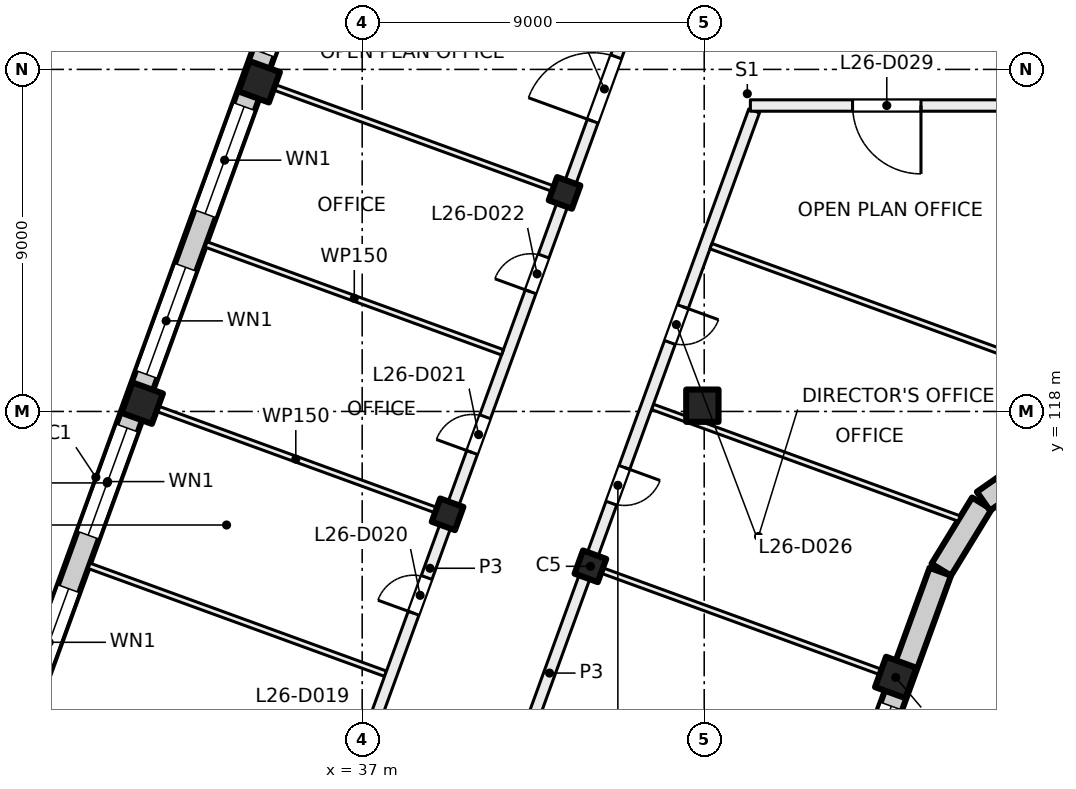
"""IFC4 building model, lengths in metres.
Left out: names, types, materials, properties, quantities, classifications, styles, units other than length and angle.
Written with IfcOpenShell. Run it as: python <this file> out.ifc"""

import sys

from ifc_helpers import new_model, si_unit, direction, frame, frame_2d, origin, origin_2d, place, context, subcontext, project, spatial, rectangle, extrude, element, fill, save


model = new_model("IFC4")
c1 = context("Model", 3, precision=1e-05, world=origin(), true_north=direction((0.0, 1.0)))
c2 = subcontext(c1, "Body", "Model", "MODEL_VIEW")
j1 = project(units=[si_unit("LENGTHUNIT", "METRE"), si_unit("PLANEANGLEUNIT", "RADIAN")], contexts=[c1])
p1 = place(None, origin())
s1 = spatial("IfcSite", under=j1, at=p1, CompositionType="ELEMENT")
p2 = place(p1, origin())
s2 = spatial("IfcBuilding", under=s1, at=p2, CompositionType="ELEMENT")
p3 = place(p2, frame((0.0, 0.0, 113.0)))
s3 = spatial("IfcBuildingStorey", under=s2, at=p3, CompositionType="ELEMENT", Elevation=113.0)
p4 = place(p3, frame((45.952, 118.152, 0.0), z_axis=(0.0, 0.0, 1.0), x_axis=(1.0, 0.0, 0.0)))
e1 = element("IfcColumn", 1, at=p4, inside=s3, PredefinedType="COLUMN", context=c2, shape_type="SweptSolid", body=[
    extrude(rectangle(XDim=0.85, YDim=0.85, at=origin_2d()), origin(), (0.0, 0.0, 1.0), 4.0),
])
for number, where, z_axis, x_axis in (
    (2, (43.006, 113.925, 0.0), (0.0, 0.0, 1.0), (-0.342, -0.94, 0.0)),
    (3, (42.325, 123.751, 0.0), (0.0, 0.0, 1.0), (-0.342, -0.94, 0.0)),
    (4, (39.247, 115.293, 0.0), (0.0, 0.0, 1.0), (-0.342, -0.94, 0.0)),
):
    element("IfcColumn", number, at=place(p3, frame(where, z_axis=z_axis, x_axis=x_axis)), inside=s3, PredefinedType="COLUMN", context=c2, shape_type="SweptSolid", body=[
        extrude(rectangle(XDim=0.65, YDim=0.65, at=origin_2d()), origin(), (0.0, 0.0, 1.0), 4.0),
    ])
for number, where, z_axis, x_axis in (
    (5, (51.04, 111.001, 0.0), (0.0, 0.0, 1.0), (-0.342, -0.94, 0.0)),
    (6, (34.291, 126.675, 0.0), (0.0, 0.0, 1.0), (-0.342, -0.94, 0.0)),
    (7, (31.212, 118.218, 0.0), (0.0, 0.0, 1.0), (-0.342, -0.94, 0.0)),
):
    element("IfcColumn", number, at=place(p3, frame(where, z_axis=z_axis, x_axis=x_axis)), inside=s3, PredefinedType="COLUMN", context=c2, shape_type="SweptSolid", body=[
        extrude(rectangle(XDim=0.85, YDim=0.85, at=origin_2d()), origin(), (0.0, 0.0, 1.0), 4.0),
    ])
p5 = place(p3, frame((52.212, 113.783, 0.0), z_axis=(0.0, 0.0, 1.0), x_axis=(-0.34202521188, -0.939690775968, 0.0)))
e8 = element("IfcWall", 8, at=p5, inside=s3, PredefinedType="SOLIDWALL", context=c2, shape_type="SweptSolid", body=[
    extrude(rectangle(XDim=21.745, YDim=0.6, at=frame_2d((10.873, 0.0))), origin(), (0.0, 0.0, 1.0), 3.625),
])
p6 = place(p5, frame((3.765, 0.0, 0.9)))
e9 = element("IfcOpeningElement", 9, at=p6, cuts=e8, PredefinedType="OPENING", context=c2, shape_type="SweptSolid", body=[
    extrude(rectangle(XDim=3.0, YDim=2.4, at=frame_2d((1.5, 1.2))), frame((0.0, 0.31, 0.0), z_axis=(0.0, -1.0, 0.0), x_axis=(1.0, 0.0, 0.0)), (0.0, 0.0, 1.0), 0.62),
])
p7 = place(p5, frame((8.265, 0.0, 0.9)))
e10 = element("IfcOpeningElement", 10, at=p7, cuts=e8, PredefinedType="OPENING", context=c2, shape_type="SweptSolid", body=[
    extrude(rectangle(XDim=3.0, YDim=2.4, at=frame_2d((1.5, 1.2))), frame((0.0, 0.31, 0.0), z_axis=(0.0, -1.0, 0.0), x_axis=(1.0, 0.0, 0.0)), (0.0, 0.0, 1.0), 0.62),
])
p8 = place(p5, frame((12.765, 0.0, 0.9)))
e11 = element("IfcOpeningElement", 11, at=p8, cuts=e8, PredefinedType="OPENING", context=c2, shape_type="SweptSolid", body=[
    extrude(rectangle(XDim=3.0, YDim=2.4, at=frame_2d((1.5, 1.2))), frame((0.0, 0.31, 0.0), z_axis=(0.0, -1.0, 0.0), x_axis=(1.0, 0.0, 0.0)), (0.0, 0.0, 1.0), 0.62),
])
p9 = place(p5, frame((17.265, 0.0, 0.9)))
e12 = element("IfcOpeningElement", 12, at=p9, cuts=e8, PredefinedType="OPENING", context=c2, shape_type="SweptSolid", body=[
    extrude(rectangle(XDim=3.0, YDim=2.4, at=frame_2d((1.5, 1.2))), frame((0.0, 0.31, 0.0), z_axis=(0.0, -1.0, 0.0), x_axis=(1.0, 0.0, 0.0)), (0.0, 0.0, 1.0), 0.62),
])
p10 = place(p3, frame((53.305, 115.578, 0.0), z_axis=(0.0, 0.0, 1.0), x_axis=(-0.522402266438, -0.852699168535, 0.0)))
e13 = element("IfcWall", 13, at=p10, inside=s3, PredefinedType="SOLIDWALL", context=c2, shape_type="SweptSolid", body=[
    extrude(rectangle(XDim=2.042, YDim=0.6, at=frame_2d((1.021, 0.0))), origin(), (0.0, 0.0, 1.0), 3.625),
])
p11 = place(p3, frame((55.062, 116.839, 0.0), z_axis=(0.0, 0.0, 1.0), x_axis=(-0.819122269495, -0.573618956815, 0.0)))
e14 = element("IfcWall", 14, at=p11, inside=s3, PredefinedType="SOLIDWALL", context=c2, shape_type="SweptSolid", body=[
    extrude(rectangle(XDim=2.092, YDim=0.6, at=frame_2d((1.046, 0.0))), origin(), (0.0, 0.0, 1.0), 3.625),
])
p12 = place(p3, frame((24.666, 100.669, 0.0), z_axis=(0.0, 0.0, 1.0), x_axis=(0.34201964167, 0.939692803373, 0.0)))
e15 = element("IfcWall", 15, at=p12, inside=s3, PredefinedType="SOLIDWALL", context=c2, shape_type="SweptSolid", body=[
    extrude(rectangle(XDim=32.884, YDim=0.6, at=frame_2d((16.442, 0.0))), origin(), (0.0, 0.0, 1.0), 3.625),
])
p13 = place(p12, frame((1.48, 0.0, 0.9)))
e16 = element("IfcOpeningElement", 16, at=p13, cuts=e15, PredefinedType="OPENING", context=c2, shape_type="SweptSolid", body=[
    extrude(rectangle(XDim=3.0, YDim=2.4, at=frame_2d((1.5, 1.2))), frame((0.0, 0.31, 0.0), z_axis=(0.0, -1.0, 0.0), x_axis=(1.0, 0.0, 0.0)), (0.0, 0.0, 1.0), 0.62),
])
p14 = place(p12, frame((5.98, 0.0, 0.9)))
e17 = element("IfcOpeningElement", 17, at=p14, cuts=e15, PredefinedType="OPENING", context=c2, shape_type="SweptSolid", body=[
    extrude(rectangle(XDim=3.0, YDim=2.4, at=frame_2d((1.5, 1.2))), frame((0.0, 0.31, 0.0), z_axis=(0.0, -1.0, 0.0), x_axis=(1.0, 0.0, 0.0)), (0.0, 0.0, 1.0), 0.62),
])
p15 = place(p12, frame((10.48, 0.0, 0.9)))
e18 = element("IfcOpeningElement", 18, at=p15, cuts=e15, PredefinedType="OPENING", context=c2, shape_type="SweptSolid", body=[
    extrude(rectangle(XDim=3.0, YDim=2.4, at=frame_2d((1.5, 1.2))), frame((0.0, 0.31, 0.0), z_axis=(0.0, -1.0, 0.0), x_axis=(1.0, 0.0, 0.0)), (0.0, 0.0, 1.0), 0.62),
])
p16 = place(p12, frame((14.98, 0.0, 0.9)))
e19 = element("IfcOpeningElement", 19, at=p16, cuts=e15, PredefinedType="OPENING", context=c2, shape_type="SweptSolid", body=[
    extrude(rectangle(XDim=3.0, YDim=2.4, at=frame_2d((1.5, 1.2))), frame((0.0, 0.31, 0.0), z_axis=(0.0, -1.0, 0.0), x_axis=(1.0, 0.0, 0.0)), (0.0, 0.0, 1.0), 0.62),
])
p17 = place(p12, frame((19.48, 0.0, 0.9)))
e20 = element("IfcOpeningElement", 20, at=p17, cuts=e15, PredefinedType="OPENING", context=c2, shape_type="SweptSolid", body=[
    extrude(rectangle(XDim=3.0, YDim=2.4, at=frame_2d((1.5, 1.2))), frame((0.0, 0.31, 0.0), z_axis=(0.0, -1.0, 0.0), x_axis=(1.0, 0.0, 0.0)), (0.0, 0.0, 1.0), 0.62),
])
p18 = place(p12, frame((23.98, 0.0, 0.9)))
e21 = element("IfcOpeningElement", 21, at=p18, cuts=e15, PredefinedType="OPENING", context=c2, shape_type="SweptSolid", body=[
    extrude(rectangle(XDim=3.0, YDim=2.4, at=frame_2d((1.5, 1.2))), frame((0.0, 0.31, 0.0), z_axis=(0.0, -1.0, 0.0), x_axis=(1.0, 0.0, 0.0)), (0.0, 0.0, 1.0), 0.62),
])
p19 = place(p12, frame((28.48, 0.0, 0.9)))
e22 = element("IfcOpeningElement", 22, at=p19, cuts=e15, PredefinedType="OPENING", context=c2, shape_type="SweptSolid", body=[
    extrude(rectangle(XDim=3.0, YDim=2.4, at=frame_2d((1.5, 1.2))), frame((0.0, 0.31, 0.0), z_axis=(0.0, -1.0, 0.0), x_axis=(1.0, 0.0, 0.0)), (0.0, 0.0, 1.0), 0.62),
])
p20 = place(p3, frame((29.814, 113.938, 0.0), z_axis=(0.0, 0.0, 1.0), x_axis=(0.939697205528, -0.342007546586, 0.0)))
e23 = element("IfcWall", 23, at=p20, inside=s3, PredefinedType="PARTITIONING", context=c2, shape_type="SweptSolid", body=[
    extrude(rectangle(XDim=8.301, YDim=0.15, at=frame_2d((4.15, 0.0))), origin(), (0.0, 0.0, 1.0), 3.625),
])
p21 = place(p3, frame((31.353, 118.166, 0.0), z_axis=(0.0, 0.0, 1.0), x_axis=(0.939687752599, -0.342033518263, 0.0)))
e24 = element("IfcWall", 24, at=p21, inside=s3, PredefinedType="PARTITIONING", context=c2, shape_type="SweptSolid", body=[
    extrude(rectangle(XDim=8.301, YDim=0.15, at=frame_2d((4.15, 0.0))), origin(), (0.0, 0.0, 1.0), 3.625),
])
p22 = place(p3, frame((32.881, 97.657, 0.0), z_axis=(0.0, 0.0, 1.0), x_axis=(0.342017360004, 0.939693633828, 0.0)))
e25 = element("IfcWall", 25, at=p22, inside=s3, PredefinedType="PARTITIONING", context=c2, shape_type="SweptSolid", body=[
    extrude(rectangle(XDim=34.516, YDim=0.3, at=frame_2d((17.258, 0.0))), origin(), (0.0, 0.0, 1.0), 3.625),
])
p23 = place(p22, frame((2.025, 0.0, 0.0)))
e26 = element("IfcOpeningElement", 26, at=p23, cuts=e25, PredefinedType="OPENING", context=c2, shape_type="SweptSolid", body=[
    extrude(rectangle(XDim=1.2, YDim=2.1, at=frame_2d((0.6, 1.05))), frame((0.0, 0.16, 0.0), z_axis=(0.0, -1.0, 0.0), x_axis=(1.0, 0.0, 0.0)), (0.0, 0.0, 1.0), 0.32),
])
p24 = place(p22, frame((7.0, 0.0, 0.0)))
e27 = element("IfcOpeningElement", 27, at=p24, cuts=e25, PredefinedType="OPENING", context=c2, shape_type="SweptSolid", body=[
    extrude(rectangle(XDim=1.0, YDim=2.1, at=frame_2d((0.5, 1.05))), frame((0.0, 0.16, 0.0), z_axis=(0.0, -1.0, 0.0), x_axis=(1.0, 0.0, 0.0)), (0.0, 0.0, 1.0), 0.32),
])
p25 = place(p22, frame((11.5, 0.0, 0.0)))
e28 = element("IfcOpeningElement", 28, at=p25, cuts=e25, PredefinedType="OPENING", context=c2, shape_type="SweptSolid", body=[
    extrude(rectangle(XDim=1.0, YDim=2.1, at=frame_2d((0.5, 1.05))), frame((0.0, 0.16, 0.0), z_axis=(0.0, -1.0, 0.0), x_axis=(1.0, 0.0, 0.0)), (0.0, 0.0, 1.0), 0.32),
])
p26 = place(p22, frame((16.0, 0.0, 0.0)))
e29 = element("IfcOpeningElement", 29, at=p26, cuts=e25, PredefinedType="OPENING", context=c2, shape_type="SweptSolid", body=[
    extrude(rectangle(XDim=1.0, YDim=2.1, at=frame_2d((0.5, 1.05))), frame((0.0, 0.16, 0.0), z_axis=(0.0, -1.0, 0.0), x_axis=(1.0, 0.0, 0.0)), (0.0, 0.0, 1.0), 0.32),
])
p27 = place(p22, frame((20.5, 0.0, 0.0)))
e30 = element("IfcOpeningElement", 30, at=p27, cuts=e25, PredefinedType="OPENING", context=c2, shape_type="SweptSolid", body=[
    extrude(rectangle(XDim=1.0, YDim=2.1, at=frame_2d((0.5, 1.05))), frame((0.0, 0.16, 0.0), z_axis=(0.0, -1.0, 0.0), x_axis=(1.0, 0.0, 0.0)), (0.0, 0.0, 1.0), 0.32),
])
p28 = place(p22, frame((25.0, 0.0, 0.0)))
e31 = element("IfcOpeningElement", 31, at=p28, cuts=e25, PredefinedType="OPENING", context=c2, shape_type="SweptSolid", body=[
    extrude(rectangle(XDim=1.0, YDim=2.1, at=frame_2d((0.5, 1.05))), frame((0.0, 0.16, 0.0), z_axis=(0.0, -1.0, 0.0), x_axis=(1.0, 0.0, 0.0)), (0.0, 0.0, 1.0), 0.32),
])
p29 = place(p22, frame((29.779, 0.0, 0.0)))
e32 = element("IfcOpeningElement", 32, at=p29, cuts=e25, PredefinedType="OPENING", context=c2, shape_type="SweptSolid", body=[
    extrude(rectangle(XDim=1.8, YDim=2.1, at=frame_2d((0.9, 1.05))), frame((0.0, 0.16, 0.0), z_axis=(0.0, -1.0, 0.0), x_axis=(1.0, 0.0, 0.0)), (0.0, 0.0, 1.0), 0.32),
])
p30 = place(p3, frame((32.892, 122.395, 0.0), z_axis=(0.0, 0.0, 1.0), x_axis=(0.939684311623, -0.3420429717, 0.0)))
e33 = element("IfcWall", 33, at=p30, inside=s3, PredefinedType="PARTITIONING", context=c2, shape_type="SweptSolid", body=[
    extrude(rectangle(XDim=8.301, YDim=0.15, at=frame_2d((4.15, 0.0))), origin(), (0.0, 0.0, 1.0), 3.625),
])
p31 = place(p3, frame((42.231, 123.785, 0.0), z_axis=(0.0, 0.0, 1.0), x_axis=(-0.939687752599, 0.342033518263, 0.0)))
e34 = element("IfcWall", 34, at=p31, inside=s3, PredefinedType="PARTITIONING", context=c2, shape_type="SweptSolid", body=[
    extrude(rectangle(XDim=8.301, YDim=0.15, at=frame_2d((4.15, 0.0))), origin(), (0.0, 0.0, 1.0), 3.625),
])
p32 = place(p3, frame((43.1, 113.891, 0.0), z_axis=(0.0, 0.0, 1.0), x_axis=(0.939670544866, -0.342080790328, 0.0)))
e35 = element("IfcWall", 35, at=p32, inside=s3, PredefinedType="PARTITIONING", context=c2, shape_type="SweptSolid", body=[
    extrude(rectangle(XDim=8.3, YDim=0.15, at=frame_2d((4.15, 0.0))), origin(), (0.0, 0.0, 1.0), 3.625),
])
p33 = place(p3, frame((44.639, 118.12, 0.0), z_axis=(0.0, 0.0, 1.0), x_axis=(0.939669707102, -0.342083091593, 0.0)))
e36 = element("IfcWall", 36, at=p33, inside=s3, PredefinedType="PARTITIONING", context=c2, shape_type="SweptSolid", body=[
    extrude(rectangle(XDim=8.589, YDim=0.15, at=frame_2d((4.295, 0.0))), origin(), (0.0, 0.0, 1.0), 3.625),
])
p34 = place(p3, frame((47.314, 125.909, 0.0), z_axis=(0.0, 0.0, 1.0), x_axis=(-0.342010770371, -0.939696032209, 0.0)))
e37 = element("IfcWall", 37, at=p34, inside=s3, PredefinedType="PARTITIONING", context=c2, shape_type="SweptSolid", body=[
    extrude(rectangle(XDim=31.485, YDim=0.3, at=frame_2d((15.742, 0.0))), origin(), (0.0, 0.0, 1.0), 3.625),
])
p35 = place(p34, frame((28.259, 0.0, 0.0)))
e38 = element("IfcOpeningElement", 38, at=p35, cuts=e37, PredefinedType="OPENING", context=c2, shape_type="SweptSolid", body=[
    extrude(rectangle(XDim=1.2, YDim=2.1, at=frame_2d((0.6, 1.05))), frame((0.0, 0.16, 0.0), z_axis=(0.0, -1.0, 0.0), x_axis=(1.0, 0.0, 0.0)), (0.0, 0.0, 1.0), 0.32),
])
p36 = place(p34, frame((18.584, 0.0, 0.0)))
e39 = element("IfcOpeningElement", 39, at=p36, cuts=e37, PredefinedType="OPENING", context=c2, shape_type="SweptSolid", body=[
    extrude(rectangle(XDim=1.8, YDim=2.1, at=frame_2d((0.9, 1.05))), frame((0.0, 0.16, 0.0), z_axis=(0.0, -1.0, 0.0), x_axis=(1.0, 0.0, 0.0)), (0.0, 0.0, 1.0), 0.32),
])
p37 = place(p34, frame((9.985, 0.0, 0.0)))
e40 = element("IfcOpeningElement", 40, at=p37, cuts=e37, PredefinedType="OPENING", context=c2, shape_type="SweptSolid", body=[
    extrude(rectangle(XDim=1.0, YDim=2.1, at=frame_2d((0.5, 1.05))), frame((0.0, 0.16, 0.0), z_axis=(0.0, -1.0, 0.0), x_axis=(1.0, 0.0, 0.0)), (0.0, 0.0, 1.0), 0.32),
])
p38 = place(p34, frame((5.484, 0.0, 0.0)))
e41 = element("IfcOpeningElement", 41, at=p38, cuts=e37, PredefinedType="OPENING", context=c2, shape_type="SweptSolid", body=[
    extrude(rectangle(XDim=1.0, YDim=2.1, at=frame_2d((0.5, 1.05))), frame((0.0, 0.16, 0.0), z_axis=(0.0, -1.0, 0.0), x_axis=(1.0, 0.0, 0.0)), (0.0, 0.0, 1.0), 0.32),
])
p39 = place(p3, frame((54.18, 119.436, 0.0), z_axis=(0.0, 0.0, 1.0), x_axis=(-0.939669476286, 0.342083725624, 0.0)))
e42 = element("IfcWall", 42, at=p39, inside=s3, PredefinedType="PARTITIONING", context=c2, shape_type="SweptSolid", body=[
    extrude(rectangle(XDim=8.516, YDim=0.15, at=frame_2d((4.258, 0.0))), origin(), (0.0, 0.0, 1.0), 3.625),
])
p40 = place(p3, frame((91.0, 126.05, 0.0), z_axis=(0.0, 0.0, 1.0), x_axis=(-1.0, 0.0, 0.0)))
e43 = element("IfcWall", 43, at=p40, inside=s3, PredefinedType="PARTITIONING", context=c2, shape_type="SweptSolid", body=[
    extrude(rectangle(XDim=43.785, YDim=0.3, at=frame_2d((21.893, 0.0))), origin(), (0.0, 0.0, 1.0), 3.625),
])
p41 = place(p40, frame((2.025, 0.0, 0.0)))
e44 = element("IfcOpeningElement", 44, at=p41, cuts=e43, PredefinedType="OPENING", context=c2, shape_type="SweptSolid", body=[
    extrude(rectangle(XDim=1.2, YDim=2.1, at=frame_2d((0.6, 1.05))), frame((0.0, 0.16, 0.0), z_axis=(0.0, -1.0, 0.0), x_axis=(1.0, 0.0, 0.0)), (0.0, 0.0, 1.0), 0.32),
])
p42 = place(p40, frame((7.0, 0.0, 0.0)))
e45 = element("IfcOpeningElement", 45, at=p42, cuts=e43, PredefinedType="OPENING", context=c2, shape_type="SweptSolid", body=[
    extrude(rectangle(XDim=1.0, YDim=2.1, at=frame_2d((0.5, 1.05))), frame((0.0, 0.16, 0.0), z_axis=(0.0, -1.0, 0.0), x_axis=(1.0, 0.0, 0.0)), (0.0, 0.0, 1.0), 0.32),
])
p43 = place(p40, frame((16.0, 0.0, 0.0)))
e46 = element("IfcOpeningElement", 46, at=p43, cuts=e43, PredefinedType="OPENING", context=c2, shape_type="SweptSolid", body=[
    extrude(rectangle(XDim=1.0, YDim=2.1, at=frame_2d((0.5, 1.05))), frame((0.0, 0.16, 0.0), z_axis=(0.0, -1.0, 0.0), x_axis=(1.0, 0.0, 0.0)), (0.0, 0.0, 1.0), 0.32),
])
p44 = place(p40, frame((28.85, 0.0, 0.0)))
e47 = element("IfcOpeningElement", 47, at=p44, cuts=e43, PredefinedType="OPENING", context=c2, shape_type="SweptSolid", body=[
    extrude(rectangle(XDim=1.8, YDim=2.1, at=frame_2d((0.9, 1.05))), frame((0.0, 0.16, 0.0), z_axis=(0.0, -1.0, 0.0), x_axis=(1.0, 0.0, 0.0)), (0.0, 0.0, 1.0), 0.32),
])
p45 = place(p40, frame((39.296, 0.0, 0.0)))
e48 = element("IfcOpeningElement", 48, at=p45, cuts=e43, PredefinedType="OPENING", context=c2, shape_type="SweptSolid", body=[
    extrude(rectangle(XDim=1.8, YDim=2.1, at=frame_2d((0.9, 1.05))), frame((0.0, 0.16, 0.0), z_axis=(0.0, -1.0, 0.0), x_axis=(1.0, 0.0, 0.0)), (0.0, 0.0, 1.0), 0.32),
])
p46 = place(p6, origin())
e49 = element("IfcWindow", 49, at=p46, inside=s3, PartitioningType="SINGLE_PANEL", PredefinedType="WINDOW", context=c2, shape_type="SweptSolid", body=[
    extrude(rectangle(XDim=3.0, YDim=2.4, at=frame_2d((1.5, 1.2))), frame((0.0, 0.03, 0.0), z_axis=(0.0, -1.0, 0.0), x_axis=(1.0, 0.0, 0.0)), (0.0, 0.0, 1.0), 0.06),
])
fill(e9, e49)
p47 = place(p15, origin())
e50 = element("IfcWindow", 50, at=p47, inside=s3, PartitioningType="SINGLE_PANEL", PredefinedType="WINDOW", context=c2, shape_type="SweptSolid", body=[
    extrude(rectangle(XDim=3.0, YDim=2.4, at=frame_2d((1.5, 1.2))), frame((0.0, 0.03, 0.0), z_axis=(0.0, -1.0, 0.0), x_axis=(1.0, 0.0, 0.0)), (0.0, 0.0, 1.0), 0.06),
])
fill(e18, e50)
p48 = place(p16, origin())
e51 = element("IfcWindow", 51, at=p48, inside=s3, PartitioningType="SINGLE_PANEL", PredefinedType="WINDOW", context=c2, shape_type="SweptSolid", body=[
    extrude(rectangle(XDim=3.0, YDim=2.4, at=frame_2d((1.5, 1.2))), frame((0.0, 0.03, 0.0), z_axis=(0.0, -1.0, 0.0), x_axis=(1.0, 0.0, 0.0)), (0.0, 0.0, 1.0), 0.06),
])
fill(e19, e51)
p49 = place(p17, origin())
e52 = element("IfcWindow", 52, at=p49, inside=s3, PartitioningType="SINGLE_PANEL", PredefinedType="WINDOW", context=c2, shape_type="SweptSolid", body=[
    extrude(rectangle(XDim=3.0, YDim=2.4, at=frame_2d((1.5, 1.2))), frame((0.0, 0.03, 0.0), z_axis=(0.0, -1.0, 0.0), x_axis=(1.0, 0.0, 0.0)), (0.0, 0.0, 1.0), 0.06),
])
fill(e20, e52)
p50 = place(p18, origin())
e53 = element("IfcWindow", 53, at=p50, inside=s3, PartitioningType="SINGLE_PANEL", PredefinedType="WINDOW", context=c2, shape_type="SweptSolid", body=[
    extrude(rectangle(XDim=3.0, YDim=2.4, at=frame_2d((1.5, 1.2))), frame((0.0, 0.03, 0.0), z_axis=(0.0, -1.0, 0.0), x_axis=(1.0, 0.0, 0.0)), (0.0, 0.0, 1.0), 0.06),
])
fill(e21, e53)
p51 = place(p19, origin())
e54 = element("IfcWindow", 54, at=p51, inside=s3, PartitioningType="SINGLE_PANEL", PredefinedType="WINDOW", context=c2, shape_type="SweptSolid", body=[
    extrude(rectangle(XDim=3.0, YDim=2.4, at=frame_2d((1.5, 1.2))), frame((0.0, 0.03, 0.0), z_axis=(0.0, -1.0, 0.0), x_axis=(1.0, 0.0, 0.0)), (0.0, 0.0, 1.0), 0.06),
])
fill(e22, e54)
p52 = place(p26, origin())
e55 = element("IfcDoor", 55, at=p52, inside=s3, OperationType="SINGLE_SWING_LEFT", PredefinedType="DOOR", context=c2, shape_type="SweptSolid", body=[
    extrude(rectangle(XDim=1.0, YDim=2.1, at=frame_2d((0.5, 1.05))), frame((0.0, 0.025, 0.0), z_axis=(0.0, -1.0, 0.0), x_axis=(1.0, 0.0, 0.0)), (0.0, 0.0, 1.0), 0.05),
])
fill(e29, e55)
p53 = place(p27, origin())
e56 = element("IfcDoor", 56, at=p53, inside=s3, OperationType="SINGLE_SWING_LEFT", PredefinedType="DOOR", context=c2, shape_type="SweptSolid", body=[
    extrude(rectangle(XDim=1.0, YDim=2.1, at=frame_2d((0.5, 1.05))), frame((0.0, 0.025, 0.0), z_axis=(0.0, -1.0, 0.0), x_axis=(1.0, 0.0, 0.0)), (0.0, 0.0, 1.0), 0.05),
])
fill(e30, e56)
p54 = place(p28, origin())
e57 = element("IfcDoor", 57, at=p54, inside=s3, OperationType="SINGLE_SWING_RIGHT", PredefinedType="DOOR", context=c2, shape_type="SweptSolid", body=[
    extrude(rectangle(XDim=1.0, YDim=2.1, at=frame_2d((0.5, 1.05))), frame((0.0, 0.025, 0.0), z_axis=(0.0, -1.0, 0.0), x_axis=(1.0, 0.0, 0.0)), (0.0, 0.0, 1.0), 0.05),
])
fill(e31, e57)
p55 = place(p37, origin())
e58 = element("IfcDoor", 58, at=p55, inside=s3, OperationType="SINGLE_SWING_LEFT", PredefinedType="DOOR", context=c2, shape_type="SweptSolid", body=[
    extrude(rectangle(XDim=1.0, YDim=2.1, at=frame_2d((0.5, 1.05))), frame((0.0, 0.025, 0.0), z_axis=(0.0, -1.0, 0.0), x_axis=(1.0, 0.0, 0.0)), (0.0, 0.0, 1.0), 0.05),
])
fill(e40, e58)
p56 = place(p38, origin())
e59 = element("IfcDoor", 59, at=p56, inside=s3, OperationType="SINGLE_SWING_LEFT", PredefinedType="DOOR", context=c2, shape_type="SweptSolid", body=[
    extrude(rectangle(XDim=1.0, YDim=2.1, at=frame_2d((0.5, 1.05))), frame((0.0, 0.025, 0.0), z_axis=(0.0, -1.0, 0.0), x_axis=(1.0, 0.0, 0.0)), (0.0, 0.0, 1.0), 0.05),
])
fill(e41, e59)
p57 = place(p29, origin())
e60 = element("IfcDoor", 60, at=p57, inside=s3, OperationType="DOUBLE_DOOR_SINGLE_SWING", PredefinedType="DOOR", context=c2, shape_type="SweptSolid", body=[
    extrude(rectangle(XDim=1.8, YDim=2.1, at=frame_2d((0.9, 1.05))), frame((0.0, 0.025, 0.0), z_axis=(0.0, -1.0, 0.0), x_axis=(1.0, 0.0, 0.0)), (0.0, 0.0, 1.0), 0.05),
])
fill(e32, e60)
p58 = place(p45, origin())
e61 = element("IfcDoor", 61, at=p58, inside=s3, OperationType="DOUBLE_DOOR_SINGLE_SWING", PredefinedType="DOOR", context=c2, shape_type="SweptSolid", body=[
    extrude(rectangle(XDim=1.8, YDim=2.1, at=frame_2d((0.9, 1.05))), frame((0.0, 0.025, 0.0), z_axis=(0.0, -1.0, 0.0), x_axis=(1.0, 0.0, 0.0)), (0.0, 0.0, 1.0), 0.05),
])
fill(e48, e61)
save(model, sys.argv[1])
